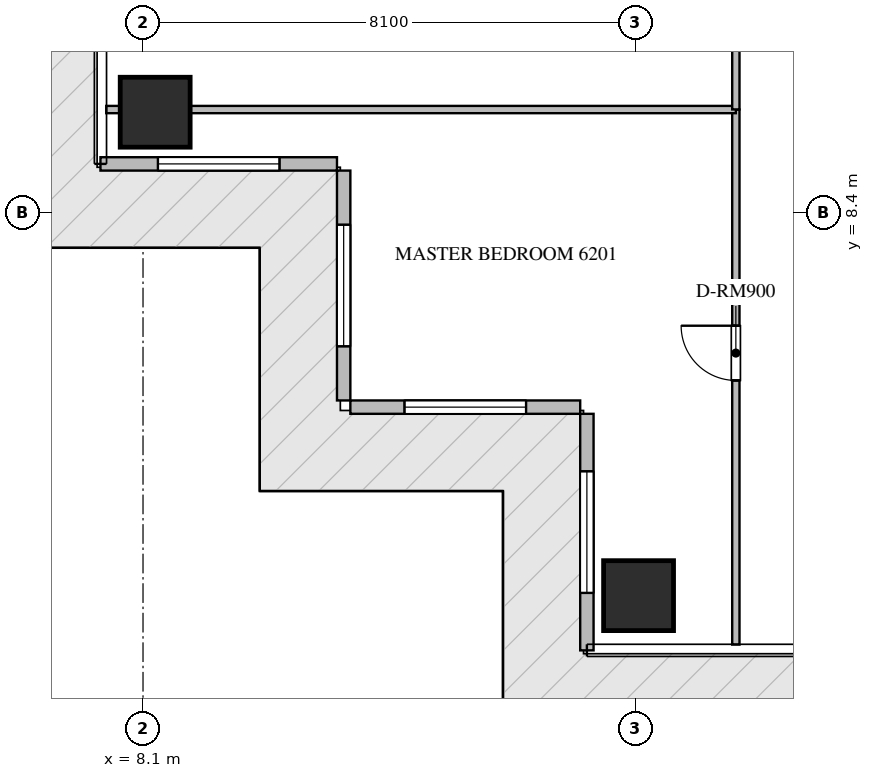
"""IFC4 building model, lengths in metres.
Left out: names, types, materials, properties, quantities, classifications, styles, units other than length and angle.
Written with IfcOpenShell. Run it as: python <this file> out.ifc"""

import sys

from ifc_helpers import new_model, si_unit, direction, frame, frame_2d, origin, origin_2d, place, context, subcontext, project, spatial, rectangle, extrude, source, transform, mapped, element, fill, save


model = new_model("IFC4")
c1 = context("Model", 3, precision=1e-05, world=origin(), true_north=direction((0.0, 1.0)))
c2 = subcontext(c1, "Body", "Model", "MODEL_VIEW")
j1 = project(units=[si_unit("LENGTHUNIT", "METRE"), si_unit("PLANEANGLEUNIT", "RADIAN")], contexts=[c1])
p1 = place(None, origin())
s1 = spatial("IfcSite", under=j1, at=p1, CompositionType="ELEMENT")
p2 = place(p1, origin())
s2 = spatial("IfcBuilding", under=s1, at=p2, CompositionType="ELEMENT")
p3 = place(p2, frame((0.0, 0.0, 248.95)))
s3 = spatial("IfcBuildingStorey", under=s2, at=p3, CompositionType="ELEMENT", Elevation=248.95)
m1 = source(origin(), c2, "Body", "SweptSolid", [
    extrude(rectangle(XDim=1.15, YDim=1.15, at=origin_2d()), origin(), (0.0, 0.0, 1.0), 3.85),
])
for number, where, z_axis, x_axis in (
    (1, (16.25, 2.1, -0.26), (0.0, 0.0, 1.0), (1.0, 0.0, 0.0)),
    (2, (8.3, 10.05, -0.26), (0.0, 0.0, 1.0), (1.0, 0.0, 0.0)),
):
    element("IfcColumn", number, at=place(p3, frame(where, z_axis=z_axis, x_axis=x_axis)), inside=s3, PredefinedType="COLUMN", context=c2, shape_type="MappedRepresentation", body=[
        mapped(m1, transform((0.0, 0.0, 0.0), scale=1.0)),
    ])
p4 = place(p3, frame((7.4, 9.2, 0.0), z_axis=(0.0, 0.0, 1.0), x_axis=(1.0, 0.0, 0.0)))
e3 = element("IfcWall", 3, at=p4, inside=s3, PredefinedType="ELEMENTEDWALL", context=c2, shape_type="SweptSolid", body=[
    extrude(rectangle(XDim=3.89, YDim=0.22, at=frame_2d((1.945, 0.0))), origin(), (0.0, 0.0, 1.0), 3.575),
])
p5 = place(p4, frame((0.945, 0.0, 0.65)))
e4 = element("IfcOpeningElement", 4, at=p5, cuts=e3, PredefinedType="OPENING", context=c2, shape_type="SweptSolid", body=[
    extrude(rectangle(XDim=2.0, YDim=2.2, at=frame_2d((1.0, 1.1))), frame((0.0, 0.12, 0.0), z_axis=(0.0, -1.0, 0.0), x_axis=(1.0, 0.0, 0.0)), (0.0, 0.0, 1.0), 0.24),
])
p6 = place(p3, frame((11.4, 9.09, 0.0), z_axis=(0.0, 0.0, 1.0), x_axis=(0.0, -1.0, 0.0)))
e5 = element("IfcWall", 5, at=p6, inside=s3, PredefinedType="ELEMENTEDWALL", context=c2, shape_type="SweptSolid", body=[
    extrude(rectangle(XDim=3.78, YDim=0.22, at=frame_2d((1.89, 0.0))), origin(), (0.0, 0.0, 1.0), 3.575),
])
p7 = place(p6, frame((0.89, 0.0, 0.65)))
e6 = element("IfcOpeningElement", 6, at=p7, cuts=e5, PredefinedType="OPENING", context=c2, shape_type="SweptSolid", body=[
    extrude(rectangle(XDim=2.0, YDim=2.2, at=frame_2d((1.0, 1.1))), frame((0.0, 0.12, 0.0), z_axis=(0.0, -1.0, 0.0), x_axis=(1.0, 0.0, 0.0)), (0.0, 0.0, 1.0), 0.24),
])
p8 = place(p3, frame((11.51, 5.2, 0.0), z_axis=(0.0, 0.0, 1.0), x_axis=(1.0, 0.0, 0.0)))
e7 = element("IfcWall", 7, at=p8, inside=s3, PredefinedType="ELEMENTEDWALL", context=c2, shape_type="SweptSolid", body=[
    extrude(rectangle(XDim=3.78, YDim=0.22, at=frame_2d((1.89, 0.0))), origin(), (0.0, 0.0, 1.0), 3.575),
])
p9 = place(p8, frame((0.89, 0.0, 0.65)))
e8 = element("IfcOpeningElement", 8, at=p9, cuts=e7, PredefinedType="OPENING", context=c2, shape_type="SweptSolid", body=[
    extrude(rectangle(XDim=2.0, YDim=2.2, at=frame_2d((1.0, 1.1))), frame((0.0, 0.12, 0.0), z_axis=(0.0, -1.0, 0.0), x_axis=(1.0, 0.0, 0.0)), (0.0, 0.0, 1.0), 0.24),
])
p10 = place(p3, frame((15.4, 5.09, 0.0), z_axis=(0.0, 0.0, 1.0), x_axis=(0.0, -1.0, 0.0)))
e9 = element("IfcWall", 9, at=p10, inside=s3, PredefinedType="ELEMENTEDWALL", context=c2, shape_type="SweptSolid", body=[
    extrude(rectangle(XDim=3.89, YDim=0.22, at=frame_2d((1.945, 0.0))), origin(), (0.0, 0.0, 1.0), 3.575),
])
p11 = place(p10, frame((0.945, 0.0, 0.65)))
e10 = element("IfcOpeningElement", 10, at=p11, cuts=e9, PredefinedType="OPENING", context=c2, shape_type="SweptSolid", body=[
    extrude(rectangle(XDim=2.0, YDim=2.2, at=frame_2d((1.0, 1.1))), frame((0.0, 0.12, 0.0), z_axis=(0.0, -1.0, 0.0), x_axis=(1.0, 0.0, 0.0)), (0.0, 0.0, 1.0), 0.24),
])
p12 = place(p3, frame((17.85, 1.295, 0.0), z_axis=(0.0, 0.0, 1.0), x_axis=(0.0, 1.0, 0.0)))
e11 = element("IfcWall", 11, at=p12, inside=s3, PredefinedType="PARTITIONING", context=c2, shape_type="SweptSolid", body=[
    extrude(rectangle(XDim=8.799, YDim=0.12, at=frame_2d((4.399, 0.0))), origin(), (0.0, 0.0, 1.0), 3.59),
])
p13 = place(p12, frame((4.344, 0.0, 0.0)))
e12 = element("IfcOpeningElement", 12, at=p13, cuts=e11, PredefinedType="OPENING", context=c2, shape_type="SweptSolid", body=[
    extrude(rectangle(XDim=0.9, YDim=2.1, at=frame_2d((0.45, 1.05))), frame((0.0, 0.07, 0.0), z_axis=(0.0, -1.0, 0.0), x_axis=(1.0, 0.0, 0.0)), (0.0, 0.0, 1.0), 0.14),
])
p14 = place(p3, frame((7.495, 10.094, 0.0), z_axis=(0.0, 0.0, 1.0), x_axis=(1.0, 0.0, 0.0)))
e13 = element("IfcWall", 13, at=p14, inside=s3, PredefinedType="PARTITIONING", context=c2, shape_type="SweptSolid", body=[
    extrude(rectangle(XDim=10.355, YDim=0.12, at=frame_2d((5.177, 0.0))), origin(), (0.0, 0.0, 1.0), 3.122),
])
p15 = place(p3, frame((17.85, 10.096, 0.0), z_axis=(0.0, 0.0, 1.0), x_axis=(0.0, 1.0, 0.0)))
e14 = element("IfcWall", 14, at=p15, inside=s3, PredefinedType="PARTITIONING", context=c2, shape_type="SweptSolid", body=[
    extrude(rectangle(XDim=4.654, YDim=0.12, at=frame_2d((2.327, 0.0))), origin(), (0.0, 0.0, 1.0), 3.59),
])
p16 = place(p15, frame((1.902, 0.0, 0.0)))
e15 = element("IfcOpeningElement", 15, at=p16, cuts=e14, PredefinedType="OPENING", context=c2, shape_type="SweptSolid", body=[
    extrude(rectangle(XDim=0.85, YDim=2.1, at=frame_2d((0.425, 1.05))), frame((0.0, 0.07, 0.0), z_axis=(0.0, -1.0, 0.0), x_axis=(1.0, 0.0, 0.0)), (0.0, 0.0, 1.0), 0.14),
])
m2 = source(origin(), c2, "Body", "SweptSolid", [
    extrude(rectangle(XDim=2.0, YDim=2.2, at=frame_2d((1.0, 1.1))), frame((0.0, 0.03, 0.0), z_axis=(0.0, -1.0, 0.0), x_axis=(1.0, 0.0, 0.0)), (0.0, 0.0, 1.0), 0.06),
])
p17 = place(p5, origin())
e16 = element("IfcWindow", 16, at=p17, inside=s3, PartitioningType="SINGLE_PANEL", PredefinedType="WINDOW", context=c2, shape_type="MappedRepresentation", body=[
    mapped(m2, transform((0.0, 0.0, 0.0), scale=1.0)),
])
fill(e4, e16)
p18 = place(p7, origin())
e17 = element("IfcWindow", 17, at=p18, inside=s3, PartitioningType="SINGLE_PANEL", PredefinedType="WINDOW", context=c2, shape_type="MappedRepresentation", body=[
    mapped(m2, transform((0.0, 0.0, 0.0), scale=1.0)),
])
fill(e6, e17)
p19 = place(p9, origin())
e18 = element("IfcWindow", 18, at=p19, inside=s3, PartitioningType="SINGLE_PANEL", PredefinedType="WINDOW", context=c2, shape_type="MappedRepresentation", body=[
    mapped(m2, transform((0.0, 0.0, 0.0), scale=1.0)),
])
fill(e8, e18)
p20 = place(p11, origin())
e19 = element("IfcWindow", 19, at=p20, inside=s3, PartitioningType="SINGLE_PANEL", PredefinedType="WINDOW", context=c2, shape_type="MappedRepresentation", body=[
    mapped(m2, transform((0.0, 0.0, 0.0), scale=1.0)),
])
fill(e10, e19)
m3 = source(origin(), c2, "Body", "SweptSolid", [
    extrude(rectangle(XDim=0.9, YDim=2.1, at=frame_2d((0.45, 1.05))), frame((0.0, 0.025, 0.0), z_axis=(0.0, -1.0, 0.0), x_axis=(1.0, 0.0, 0.0)), (0.0, 0.0, 1.0), 0.05),
])
p21 = place(p13, origin())
e20 = element("IfcDoor", 20, at=p21, inside=s3, OperationType="SINGLE_SWING_RIGHT", PredefinedType="DOOR", context=c2, shape_type="MappedRepresentation", body=[
    mapped(m3, transform((0.0, 0.0, 0.0), scale=1.0)),
])
fill(e12, e20)
save(model, sys.argv[1])
